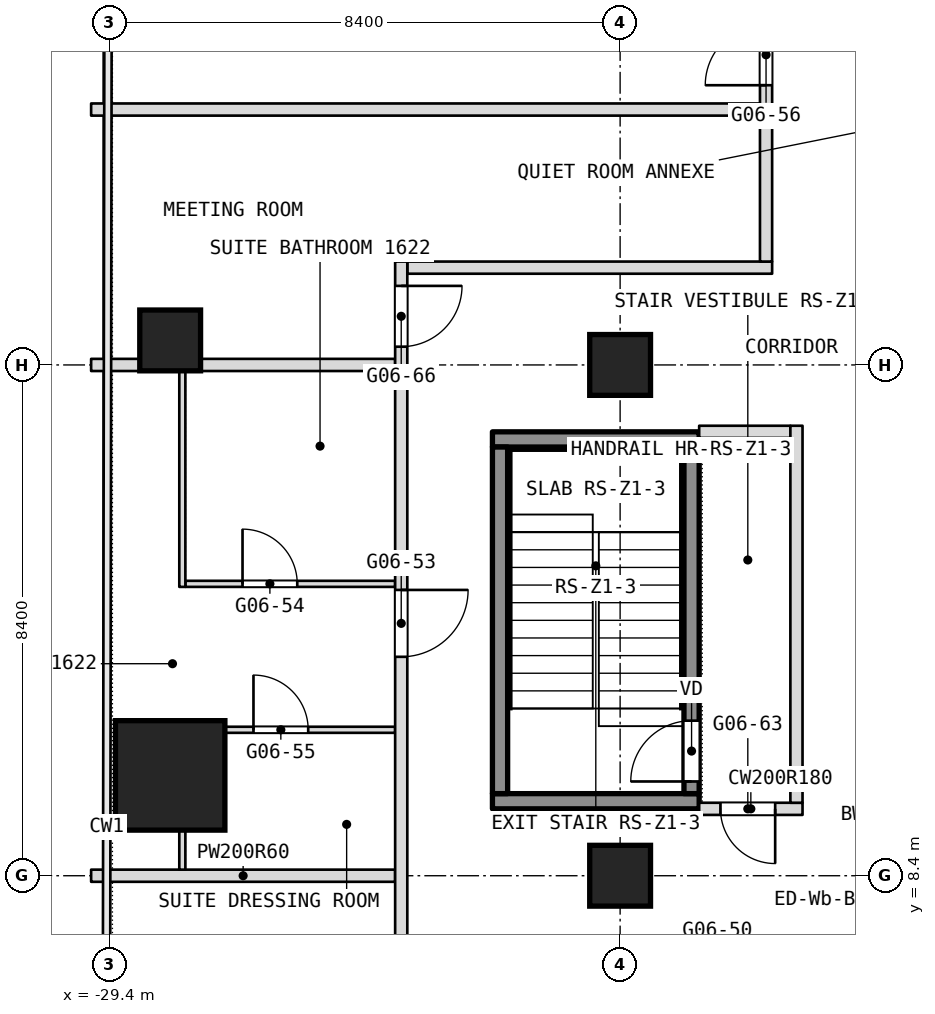
"""IFC4 building model, lengths in metres.
Left out: names, types, materials, properties, quantities, classifications, styles, units other than length and angle.
Written with IfcOpenShell. Run it as: python <this file> out.ifc"""

import sys

from ifc_helpers import new_model, si_unit, direction, frame, frame_2d, origin, origin_2d, place, context, subcontext, project, spatial, rectangle, extrude, element, fill, save


model = new_model("IFC4")
c1 = context("Model", 3, precision=1e-05, world=origin(), true_north=direction((0.0, 1.0)))
c2 = subcontext(c1, "Body", "Model", "MODEL_VIEW")
j1 = project(units=[si_unit("LENGTHUNIT", "METRE"), si_unit("PLANEANGLEUNIT", "RADIAN")], contexts=[c1])
p1 = place(None, origin())
s1 = spatial("IfcSite", under=j1, at=p1, CompositionType="ELEMENT")
p2 = place(p1, origin())
s2 = spatial("IfcBuilding", under=s1, at=p2, CompositionType="ELEMENT")
p3 = place(p2, frame((0.0, 0.0, 72.5)))
s3 = spatial("IfcBuildingStorey", under=s2, at=p3, CompositionType="ELEMENT", Elevation=72.5)
p4 = place(p3, frame((-28.4, 10.05, 0.0), z_axis=(0.0, 0.0, 1.0), x_axis=(1.0, 0.0, 0.0)))
e1 = element("IfcColumn", 1, at=p4, inside=s3, PredefinedType="COLUMN", context=c2, shape_type="SweptSolid", body=[
    extrude(rectangle(XDim=1.8, YDim=1.8, at=origin_2d()), origin(), (0.0, 0.0, 1.0), 3.6),
])
for number, where, z_axis, x_axis in (
    (2, (-21.0, 8.4, 0.0), (0.0, 0.0, 1.0), (1.0, 0.0, 0.0)),
    (3, (-21.0, 16.8, 0.0), (0.0, 0.0, 1.0), (1.0, 0.0, 0.0)),
    (4, (-28.4, 17.203, 0.0), (0.0, 0.0, 1.0), (1.0, 0.0, 0.0)),
):
    element("IfcColumn", number, at=place(p3, frame(where, z_axis=z_axis, x_axis=x_axis)), inside=s3, PredefinedType="COLUMN", context=c2, shape_type="SweptSolid", body=[
        extrude(rectangle(XDim=1.0, YDim=1.0, at=origin_2d()), origin(), (0.0, 0.0, 1.0), 3.6),
    ])
p5 = place(p3, frame((-29.7, 8.4, 0.0), z_axis=(0.0, 0.0, 1.0), x_axis=(1.0, 0.0, 0.0)))
e5 = element("IfcWall", 5, at=p5, inside=s3, PredefinedType="PARTITIONING", context=c2, shape_type="SweptSolid", body=[
    extrude(rectangle(XDim=5.0, YDim=0.2, at=frame_2d((2.5, 0.0))), origin(), (0.0, 0.0, 1.0), 2.84),
])
p6 = place(p3, frame((-19.7, 9.5, 0.0), z_axis=(0.0, 0.0, 1.0), x_axis=(1.0, 0.0, 0.0)))
e6 = element("IfcWall", 6, at=p6, inside=s3, PredefinedType="PARTITIONING", context=c2, shape_type="SweptSolid", body=[
    extrude(rectangle(XDim=1.7, YDim=0.2, at=frame_2d((0.85, 0.0))), origin(), (0.0, 0.0, 1.0), 3.34),
])
p7 = place(p6, frame((0.35, 0.0, 0.0)))
e7 = element("IfcOpeningElement", 7, at=p7, cuts=e6, PredefinedType="OPENING", context=c2, shape_type="SweptSolid", body=[
    extrude(rectangle(XDim=0.9, YDim=2.1, at=frame_2d((0.45, 1.05))), frame((0.0, 0.1, 0.0), z_axis=(0.0, -1.0, 0.0), x_axis=(1.0, 0.0, 0.0)), (0.0, 0.0, 1.0), 0.2),
])
p8 = place(p3, frame((-27.5, 10.8, 0.0), z_axis=(0.0, 0.0, 1.0), x_axis=(1.0, 0.0, 0.0)))
e8 = element("IfcWall", 8, at=p8, inside=s3, PredefinedType="PARTITIONING", context=c2, shape_type="SweptSolid", body=[
    extrude(rectangle(XDim=2.8, YDim=0.1, at=frame_2d((1.4, 0.0))), origin(), (0.0, 0.0, 1.0), 3.34),
])
p9 = place(p8, frame((0.47, 0.0, 0.0)))
e9 = element("IfcOpeningElement", 9, at=p9, cuts=e8, PredefinedType="OPENING", context=c2, shape_type="SweptSolid", body=[
    extrude(rectangle(XDim=0.9, YDim=2.1, at=frame_2d((0.45, 1.05))), frame((0.0, 0.05, 0.0), z_axis=(0.0, -1.0, 0.0), x_axis=(1.0, 0.0, 0.0)), (0.0, 0.0, 1.0), 0.1),
])
p10 = place(p3, frame((-28.15, 13.2, 0.0), z_axis=(0.0, 0.0, 1.0), x_axis=(1.0, 0.0, 0.0)))
e10 = element("IfcWall", 10, at=p10, inside=s3, PredefinedType="PARTITIONING", context=c2, shape_type="SweptSolid", body=[
    extrude(rectangle(XDim=3.45, YDim=0.1, at=frame_2d((1.725, 0.0))), origin(), (0.0, 0.0, 1.0), 3.34),
])
p11 = place(p10, frame((0.94, 0.0, 0.0)))
e11 = element("IfcOpeningElement", 11, at=p11, cuts=e10, PredefinedType="OPENING", context=c2, shape_type="SweptSolid", body=[
    extrude(rectangle(XDim=0.9, YDim=2.1, at=frame_2d((0.45, 1.05))), frame((0.0, 0.05, 0.0), z_axis=(0.0, -1.0, 0.0), x_axis=(1.0, 0.0, 0.0)), (0.0, 0.0, 1.0), 0.1),
])
p12 = place(p3, frame((-19.7, 15.7, 0.0), z_axis=(0.0, 0.0, 1.0), x_axis=(1.0, 0.0, 0.0)))
e12 = element("IfcWall", 12, at=p12, inside=s3, PredefinedType="PARTITIONING", context=c2, shape_type="SweptSolid", body=[
    extrude(rectangle(XDim=1.5, YDim=0.2, at=frame_2d((0.75, 0.0))), origin(), (0.0, 0.0, 1.0), 3.34),
])
p13 = place(p3, frame((-29.7, 16.8, 0.0), z_axis=(0.0, 0.0, 1.0), x_axis=(1.0, 0.0, 0.0)))
e13 = element("IfcWall", 13, at=p13, inside=s3, PredefinedType="PARTITIONING", context=c2, shape_type="SweptSolid", body=[
    extrude(rectangle(XDim=5.0, YDim=0.2, at=frame_2d((2.5, 0.0))), origin(), (0.0, 0.0, 1.0), 2.84),
])
p14 = place(p3, frame((-18.1, 9.6, 0.0), z_axis=(0.0, 0.0, 1.0), x_axis=(0.0, 1.0, 0.0)))
e14 = element("IfcWall", 14, at=p14, inside=s3, PredefinedType="PARTITIONING", context=c2, shape_type="SweptSolid", body=[
    extrude(rectangle(XDim=6.2, YDim=0.2, at=frame_2d((3.1, 0.0))), origin(), (0.0, 0.0, 1.0), 3.34),
])
p15 = place(p3, frame((-24.5, 18.4, 0.0), z_axis=(0.0, 0.0, 1.0), x_axis=(1.0, 0.0, 0.0)))
e15 = element("IfcWall", 15, at=p15, inside=s3, PredefinedType="PARTITIONING", context=c2, shape_type="SweptSolid", body=[
    extrude(rectangle(XDim=6.0, YDim=0.2, at=frame_2d((3.0, 0.0))), origin(), (0.0, 0.0, 1.0), 3.34),
])
p16 = place(p3, frame((-18.6, 18.5, 0.0), z_axis=(0.0, 0.0, 1.0), x_axis=(0.0, 1.0, 0.0)))
e16 = element("IfcWall", 16, at=p16, inside=s3, PredefinedType="PARTITIONING", context=c2, shape_type="SweptSolid", body=[
    extrude(rectangle(XDim=15.04, YDim=0.2, at=frame_2d((7.52, 0.0))), origin(), (0.0, 0.0, 1.0), 3.34),
])
p17 = place(p16, frame((2.9, 0.0, 0.0)))
e17 = element("IfcOpeningElement", 17, at=p17, cuts=e16, PredefinedType="OPENING", context=c2, shape_type="SweptSolid", body=[
    extrude(rectangle(XDim=1.0, YDim=2.1, at=frame_2d((0.5, 1.05))), frame((0.0, 0.1, 0.0), z_axis=(0.0, -1.0, 0.0), x_axis=(1.0, 0.0, 0.0)), (0.0, 0.0, 1.0), 0.2),
])
p18 = place(p16, frame((8.25, 0.0, 0.0)))
e18 = element("IfcOpeningElement", 18, at=p18, cuts=e16, PredefinedType="OPENING", context=c2, shape_type="SweptSolid", body=[
    extrude(rectangle(XDim=1.1, YDim=2.1, at=frame_2d((0.55, 1.05))), frame((0.0, 0.1, 0.0), z_axis=(0.0, -1.0, 0.0), x_axis=(1.0, 0.0, 0.0)), (0.0, 0.0, 1.0), 0.2),
])
p19 = place(p3, frame((-29.7, 21.0, 0.0), z_axis=(0.0, 0.0, 1.0), x_axis=(1.0, 0.0, 0.0)))
e19 = element("IfcWall", 19, at=p19, inside=s3, PredefinedType="PARTITIONING", context=c2, shape_type="SweptSolid", body=[
    extrude(rectangle(XDim=11.0, YDim=0.2, at=frame_2d((5.5, 0.0))), origin(), (0.0, 0.0, 1.0), 3.34),
])
p20 = place(p3, frame((-24.6, 6.9, 0.0), z_axis=(0.0, 0.0, 1.0), x_axis=(0.0, 1.0, 0.0)))
e20 = element("IfcWall", 20, at=p20, inside=s3, PredefinedType="PARTITIONING", context=c2, shape_type="SweptSolid", body=[
    extrude(rectangle(XDim=11.6, YDim=0.2, at=frame_2d((5.8, 0.0))), origin(), (0.0, 0.0, 1.0), 3.34),
])
p21 = place(p20, frame((5.1, 0.0, 0.0)))
e21 = element("IfcOpeningElement", 21, at=p21, cuts=e20, PredefinedType="OPENING", context=c2, shape_type="SweptSolid", body=[
    extrude(rectangle(XDim=1.1, YDim=2.1, at=frame_2d((0.55, 1.05))), frame((0.0, 0.1, 0.0), z_axis=(0.0, -1.0, 0.0), x_axis=(1.0, 0.0, 0.0)), (0.0, 0.0, 1.0), 0.2),
])
p22 = place(p20, frame((10.2, 0.0, 0.0)))
e22 = element("IfcOpeningElement", 22, at=p22, cuts=e20, PredefinedType="OPENING", context=c2, shape_type="SweptSolid", body=[
    extrude(rectangle(XDim=1.0, YDim=2.1, at=frame_2d((0.5, 1.05))), frame((0.0, 0.1, 0.0), z_axis=(0.0, -1.0, 0.0), x_axis=(1.0, 0.0, 0.0)), (0.0, 0.0, 1.0), 0.2),
])
p23 = place(p3, frame((-28.2, 8.5, 0.0), z_axis=(0.0, 0.0, 1.0), x_axis=(0.0, 1.0, 0.0)))
e23 = element("IfcWall", 23, at=p23, inside=s3, PredefinedType="PARTITIONING", context=c2, shape_type="SweptSolid", body=[
    extrude(rectangle(XDim=0.65, YDim=0.1, at=frame_2d((0.325, 0.0))), origin(), (0.0, 0.0, 1.0), 2.94),
])
p24 = place(p3, frame((-28.2, 13.15, 0.0), z_axis=(0.0, 0.0, 1.0), x_axis=(0.0, 1.0, 0.0)))
e24 = element("IfcWall", 24, at=p24, inside=s3, PredefinedType="PARTITIONING", context=c2, shape_type="SweptSolid", body=[
    extrude(rectangle(XDim=3.75, YDim=0.1, at=frame_2d((1.875, 0.0))), origin(), (0.0, 0.0, 1.0), 2.94),
])
for number, where, z_axis, x_axis in (
    (25, (-23.1, 9.625, 0.1), (0.0, 0.0, 1.0), (1.0, 0.0, 0.0)),
    (26, (-23.1, 15.575, 0.1), (0.0, 0.0, 1.0), (1.0, 0.0, 0.0)),
):
    element("IfcWall", number, at=place(p3, frame(where, z_axis=z_axis, x_axis=x_axis)), inside=s3, PredefinedType="SHEAR", context=c2, shape_type="SweptSolid", body=[
        extrude(rectangle(XDim=3.4, YDim=0.25, at=frame_2d((1.7, 0.0))), origin(), (0.0, 0.0, 1.0), 3.6),
    ])
p25 = place(p3, frame((-22.975, 9.75, 0.1), z_axis=(0.0, 0.0, 1.0), x_axis=(0.0, 1.0, 0.0)))
e27 = element("IfcWall", 27, at=p25, inside=s3, PredefinedType="SHEAR", context=c2, shape_type="SweptSolid", body=[
    extrude(rectangle(XDim=5.7, YDim=0.25, at=frame_2d((2.85, 0.0))), origin(), (0.0, 0.0, 1.0), 3.6),
])
p26 = place(p3, frame((-19.825, 9.75, 0.1), z_axis=(0.0, 0.0, 1.0), x_axis=(0.0, 1.0, 0.0)))
e28 = element("IfcWall", 28, at=p26, inside=s3, PredefinedType="SHEAR", context=c2, shape_type="SweptSolid", body=[
    extrude(rectangle(XDim=5.7, YDim=0.25, at=frame_2d((2.85, 0.0))), origin(), (0.0, 0.0, 1.0), 3.6),
])
p27 = place(p26, frame((0.2, 0.0, 0.0)))
e29 = element("IfcOpeningElement", 29, at=p27, cuts=e28, PredefinedType="OPENING", context=c2, shape_type="SweptSolid", body=[
    extrude(rectangle(XDim=1.0, YDim=2.1, at=frame_2d((0.5, 1.05))), frame((0.0, 0.125, 0.0), z_axis=(0.0, -1.0, 0.0), x_axis=(1.0, 0.0, 0.0)), (0.0, 0.0, 1.0), 0.25),
])
p28 = place(p7, origin())
e30 = element("IfcDoor", 30, at=p28, inside=s3, OperationType="SINGLE_SWING_RIGHT", PredefinedType="DOOR", context=c2, shape_type="SweptSolid", body=[
    extrude(rectangle(XDim=0.9, YDim=2.1, at=frame_2d((0.45, 1.05))), frame((0.0, 0.025, 0.0), z_axis=(0.0, -1.0, 0.0), x_axis=(1.0, 0.0, 0.0)), (0.0, 0.0, 1.0), 0.05),
])
fill(e7, e30)
p29 = place(p9, origin())
e31 = element("IfcDoor", 31, at=p29, inside=s3, OperationType="SINGLE_SWING_RIGHT", PredefinedType="DOOR", context=c2, shape_type="SweptSolid", body=[
    extrude(rectangle(XDim=0.9, YDim=2.1, at=frame_2d((0.45, 1.05))), frame((0.0, 0.025, 0.0), z_axis=(0.0, -1.0, 0.0), x_axis=(1.0, 0.0, 0.0)), (0.0, 0.0, 1.0), 0.05),
])
fill(e9, e31)
p30 = place(p11, origin())
e32 = element("IfcDoor", 32, at=p30, inside=s3, OperationType="SINGLE_SWING_LEFT", PredefinedType="DOOR", context=c2, shape_type="SweptSolid", body=[
    extrude(rectangle(XDim=0.9, YDim=2.1, at=frame_2d((0.45, 1.05))), frame((0.0, 0.025, 0.0), z_axis=(0.0, -1.0, 0.0), x_axis=(1.0, 0.0, 0.0)), (0.0, 0.0, 1.0), 0.05),
])
fill(e11, e32)
p31 = place(p17, origin())
e33 = element("IfcDoor", 33, at=p31, inside=s3, OperationType="SINGLE_SWING_LEFT", PredefinedType="DOOR", context=c2, shape_type="SweptSolid", body=[
    extrude(rectangle(XDim=1.0, YDim=2.1, at=frame_2d((0.5, 1.05))), frame((0.0, 0.025, 0.0), z_axis=(0.0, -1.0, 0.0), x_axis=(1.0, 0.0, 0.0)), (0.0, 0.0, 1.0), 0.05),
])
fill(e17, e33)
p32 = place(p21, origin())
e34 = element("IfcDoor", 34, at=p32, inside=s3, OperationType="SINGLE_SWING_RIGHT", PredefinedType="DOOR", context=c2, shape_type="SweptSolid", body=[
    extrude(rectangle(XDim=1.1, YDim=2.1, at=frame_2d((0.55, 1.05))), frame((0.0, 0.025, 0.0), z_axis=(0.0, -1.0, 0.0), x_axis=(1.0, 0.0, 0.0)), (0.0, 0.0, 1.0), 0.05),
])
fill(e21, e34)
p33 = place(p22, origin())
e35 = element("IfcDoor", 35, at=p33, inside=s3, OperationType="SINGLE_SWING_RIGHT", PredefinedType="DOOR", context=c2, shape_type="SweptSolid", body=[
    extrude(rectangle(XDim=1.0, YDim=2.1, at=frame_2d((0.5, 1.05))), frame((0.0, 0.025, 0.0), z_axis=(0.0, -1.0, 0.0), x_axis=(1.0, 0.0, 0.0)), (0.0, 0.0, 1.0), 0.05),
])
fill(e22, e35)
p34 = place(p27, origin())
e36 = element("IfcDoor", 36, at=p34, inside=s3, OperationType="SINGLE_SWING_LEFT", PredefinedType="DOOR", context=c2, shape_type="SweptSolid", body=[
    extrude(rectangle(XDim=1.0, YDim=2.1, at=frame_2d((0.5, 1.05))), frame((0.0, 0.025, 0.0), z_axis=(0.0, -1.0, 0.0), x_axis=(1.0, 0.0, 0.0)), (0.0, 0.0, 1.0), 0.05),
])
fill(e29, e36)
save(model, sys.argv[1])
